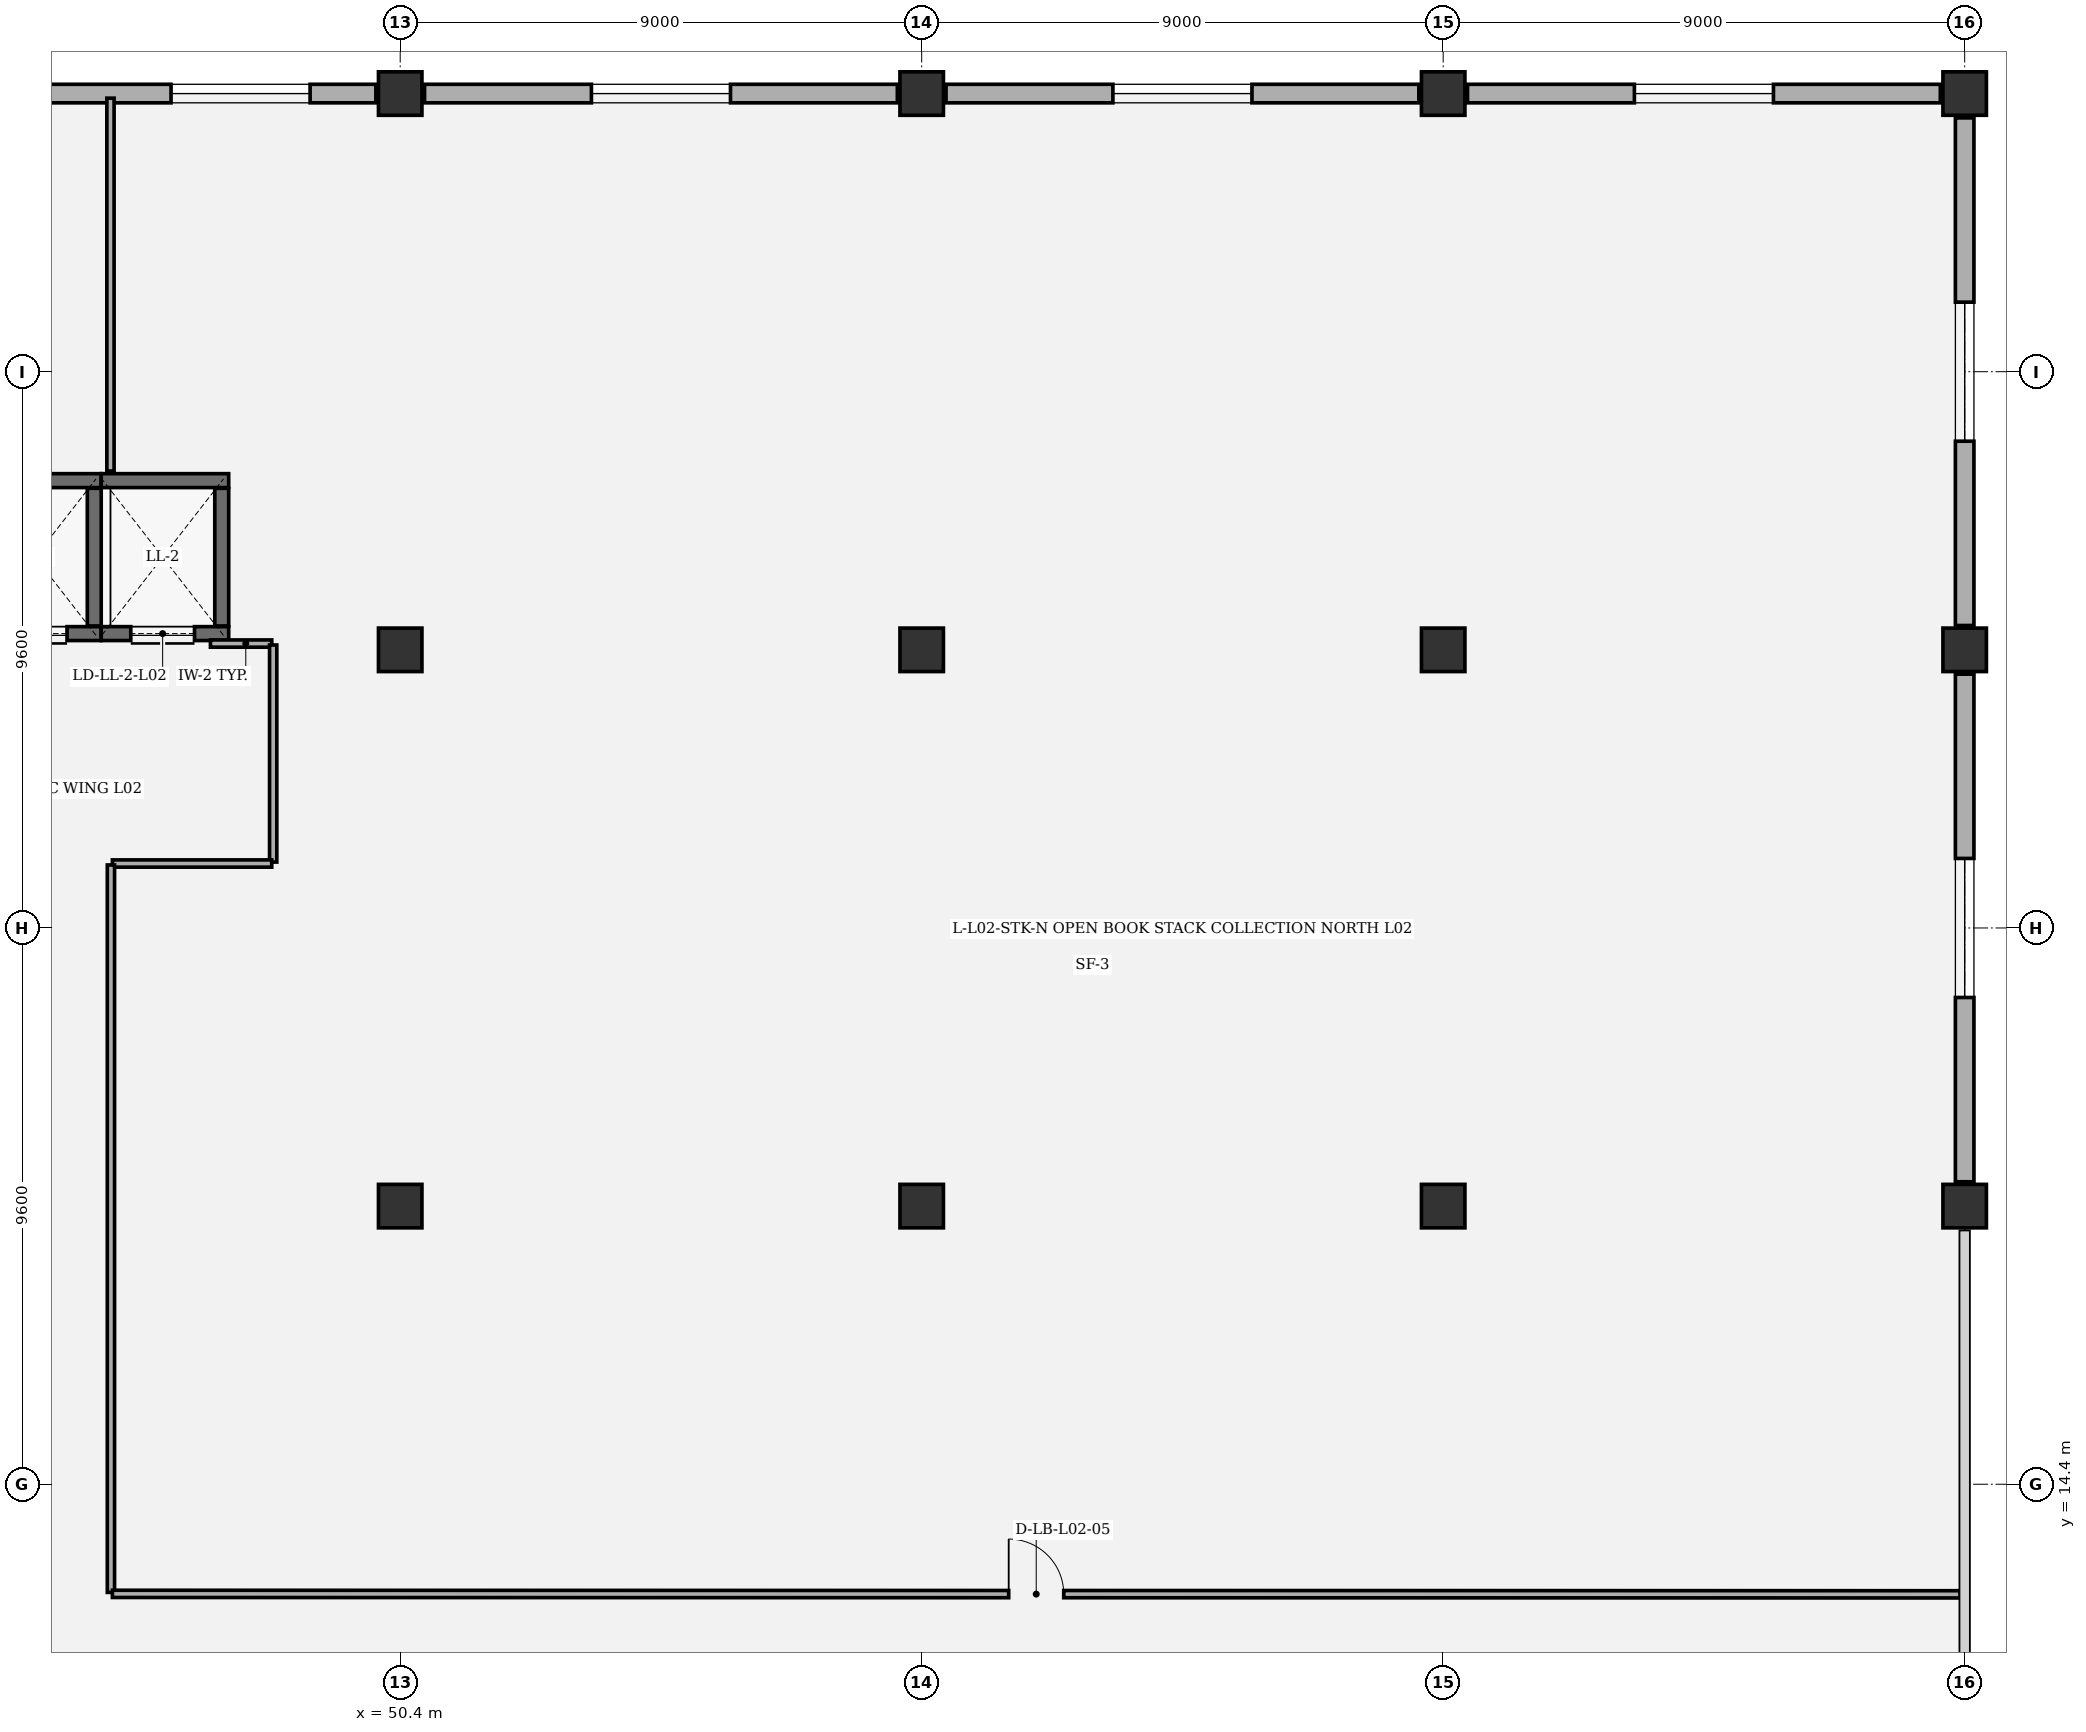
"""IFC4 building model, lengths in metres.
Left out: names, types, materials, properties, quantities, classifications, styles, units other than length and angle.
Written with IfcOpenShell. Run it as: python <this file> out.ifc"""

import sys

from ifc_helpers import new_model, si_unit, direction, frame, frame_2d, origin, origin_2d, place, context, subcontext, project, spatial, rectangle, extrude, element, fill, save


model = new_model("IFC4")
c1 = context("Model", 3, precision=1e-05, world=origin(), true_north=direction((0.0, 1.0)))
c2 = subcontext(c1, "Body", "Model", "MODEL_VIEW")
j1 = project(units=[si_unit("LENGTHUNIT", "METRE"), si_unit("PLANEANGLEUNIT", "RADIAN")], contexts=[c1])
p1 = place(None, origin())
s1 = spatial("IfcSite", under=j1, at=p1, CompositionType="ELEMENT")
p2 = place(p1, origin())
s2 = spatial("IfcBuilding", under=s1, at=p2, CompositionType="ELEMENT")
p3 = place(p2, frame((0.0, 0.0, 12.0)))
s3 = spatial("IfcBuildingStorey", under=s2, at=p3, CompositionType="ELEMENT", Elevation=12.0)
for number, where, z_axis, x_axis in (
    (1, (50.4, 19.2, 0.0), (0.0, 0.0, 1.0), (1.0, 0.0, 0.0)),
    (2, (50.4, 28.8, 0.0), (0.0, 0.0, 1.0), (1.0, 0.0, 0.0)),
    (3, (50.4, 38.4, 0.0), (0.0, 0.0, 1.0), (1.0, 0.0, 0.0)),
    (4, (59.4, 19.2, 0.0), (0.0, 0.0, 1.0), (1.0, 0.0, 0.0)),
    (5, (59.4, 28.8, 0.0), (0.0, 0.0, 1.0), (1.0, 0.0, 0.0)),
    (6, (59.4, 38.4, 0.0), (0.0, 0.0, 1.0), (1.0, 0.0, 0.0)),
    (7, (68.4, 19.2, 0.0), (0.0, 0.0, 1.0), (1.0, 0.0, 0.0)),
    (8, (68.4, 28.8, 0.0), (0.0, 0.0, 1.0), (1.0, 0.0, 0.0)),
    (9, (68.4, 38.4, 0.0), (0.0, 0.0, 1.0), (1.0, 0.0, 0.0)),
    (10, (77.4, 19.2, 0.0), (0.0, 0.0, 1.0), (1.0, 0.0, 0.0)),
    (11, (77.4, 28.8, 0.0), (0.0, 0.0, 1.0), (1.0, 0.0, 0.0)),
    (12, (77.4, 38.4, 0.0), (0.0, 0.0, 1.0), (1.0, 0.0, 0.0)),
):
    element("IfcColumn", number, at=place(p3, frame(where, z_axis=z_axis, x_axis=x_axis)), inside=s3, PredefinedType="COLUMN", context=c2, shape_type="SweptSolid", body=[
        extrude(rectangle(XDim=0.75, YDim=0.75, at=origin_2d()), origin(), (0.0, 0.0, 1.0), 5.0),
    ])
p4 = place(p3, frame((77.4, 28.38, 0.0), z_axis=(0.0, 0.0, 1.0), x_axis=(0.0, -1.0, 0.0)))
e13 = element("IfcWall", 13, at=p4, inside=s3, PredefinedType="SOLIDWALL", context=c2, shape_type="SweptSolid", body=[
    extrude(rectangle(XDim=8.76, YDim=0.32, at=frame_2d((4.38, 0.0))), origin(), (0.0, 0.0, 1.0), 3.937),
])
p5 = place(p4, frame((3.18, 0.0, 0.8)))
e14 = element("IfcOpeningElement", 14, at=p5, cuts=e13, PredefinedType="OPENING", context=c2, shape_type="SweptSolid", body=[
    extrude(rectangle(XDim=2.4, YDim=1.65, at=frame_2d((1.2, 0.825))), frame((0.0, 0.17, 0.0), z_axis=(0.0, -1.0, 0.0), x_axis=(1.0, 0.0, 0.0)), (0.0, 0.0, 1.0), 0.34),
])
p6 = place(p3, frame((77.4, 37.98, 0.0), z_axis=(0.0, 0.0, 1.0), x_axis=(0.0, -1.0, 0.0)))
e15 = element("IfcWall", 15, at=p6, inside=s3, PredefinedType="SOLIDWALL", context=c2, shape_type="SweptSolid", body=[
    extrude(rectangle(XDim=8.76, YDim=0.32, at=frame_2d((4.38, 0.0))), origin(), (0.0, 0.0, 1.0), 3.937),
])
p7 = place(p6, frame((3.18, 0.0, 0.8)))
e16 = element("IfcOpeningElement", 16, at=p7, cuts=e15, PredefinedType="OPENING", context=c2, shape_type="SweptSolid", body=[
    extrude(rectangle(XDim=2.4, YDim=1.65, at=frame_2d((1.2, 0.825))), frame((0.0, 0.17, 0.0), z_axis=(0.0, -1.0, 0.0), x_axis=(1.0, 0.0, 0.0)), (0.0, 0.0, 1.0), 0.34),
])
p8 = place(p3, frame((68.82, 38.4, 0.0), z_axis=(0.0, 0.0, 1.0), x_axis=(1.0, 0.0, 0.0)))
e17 = element("IfcWall", 17, at=p8, inside=s3, PredefinedType="SOLIDWALL", context=c2, shape_type="SweptSolid", body=[
    extrude(rectangle(XDim=8.16, YDim=0.32, at=frame_2d((4.08, 0.0))), origin(), (0.0, 0.0, 1.0), 3.937),
])
p9 = place(p8, frame((2.88, 0.0, 0.8)))
e18 = element("IfcOpeningElement", 18, at=p9, cuts=e17, PredefinedType="OPENING", context=c2, shape_type="SweptSolid", body=[
    extrude(rectangle(XDim=2.4, YDim=1.65, at=frame_2d((1.2, 0.825))), frame((0.0, 0.17, 0.0), z_axis=(0.0, -1.0, 0.0), x_axis=(1.0, 0.0, 0.0)), (0.0, 0.0, 1.0), 0.34),
])
p10 = place(p3, frame((59.82, 38.4, 0.0), z_axis=(0.0, 0.0, 1.0), x_axis=(1.0, 0.0, 0.0)))
e19 = element("IfcWall", 19, at=p10, inside=s3, PredefinedType="SOLIDWALL", context=c2, shape_type="SweptSolid", body=[
    extrude(rectangle(XDim=8.16, YDim=0.32, at=frame_2d((4.08, 0.0))), origin(), (0.0, 0.0, 1.0), 3.937),
])
p11 = place(p10, frame((2.88, 0.0, 0.8)))
e20 = element("IfcOpeningElement", 20, at=p11, cuts=e19, PredefinedType="OPENING", context=c2, shape_type="SweptSolid", body=[
    extrude(rectangle(XDim=2.4, YDim=1.65, at=frame_2d((1.2, 0.825))), frame((0.0, 0.17, 0.0), z_axis=(0.0, -1.0, 0.0), x_axis=(1.0, 0.0, 0.0)), (0.0, 0.0, 1.0), 0.34),
])
p12 = place(p3, frame((50.82, 38.4, 0.0), z_axis=(0.0, 0.0, 1.0), x_axis=(1.0, 0.0, 0.0)))
e21 = element("IfcWall", 21, at=p12, inside=s3, PredefinedType="SOLIDWALL", context=c2, shape_type="SweptSolid", body=[
    extrude(rectangle(XDim=8.16, YDim=0.32, at=frame_2d((4.08, 0.0))), origin(), (0.0, 0.0, 1.0), 3.937),
])
p13 = place(p12, frame((2.88, 0.0, 0.8)))
e22 = element("IfcOpeningElement", 22, at=p13, cuts=e21, PredefinedType="OPENING", context=c2, shape_type="SweptSolid", body=[
    extrude(rectangle(XDim=2.4, YDim=1.65, at=frame_2d((1.2, 0.825))), frame((0.0, 0.17, 0.0), z_axis=(0.0, -1.0, 0.0), x_axis=(1.0, 0.0, 0.0)), (0.0, 0.0, 1.0), 0.34),
])
p14 = place(p3, frame((41.82, 38.4, 0.0), z_axis=(0.0, 0.0, 1.0), x_axis=(1.0, 0.0, 0.0)))
e23 = element("IfcWall", 23, at=p14, inside=s3, PredefinedType="SOLIDWALL", context=c2, shape_type="SweptSolid", body=[
    extrude(rectangle(XDim=8.16, YDim=0.32, at=frame_2d((4.08, 0.0))), origin(), (0.0, 0.0, 1.0), 3.937),
])
p15 = place(p14, frame((4.625, 0.0, 0.8)))
e24 = element("IfcOpeningElement", 24, at=p15, cuts=e23, PredefinedType="OPENING", context=c2, shape_type="SweptSolid", body=[
    extrude(rectangle(XDim=2.4, YDim=1.65, at=frame_2d((1.2, 0.825))), frame((0.0, 0.17, 0.0), z_axis=(0.0, -1.0, 0.0), x_axis=(1.0, 0.0, 0.0)), (0.0, 0.0, 1.0), 0.34),
])
p16 = place(p3, frame((45.24, 29.08, 0.0), z_axis=(0.0, 0.0, 1.0), x_axis=(-1.0, 0.0, 0.0)))
e25 = element("IfcWall", 25, at=p16, inside=s3, PredefinedType="SHEAR", context=c2, shape_type="SweptSolid", body=[
    extrude(rectangle(XDim=2.28, YDim=0.24, at=frame_2d((1.14, 0.0))), origin(), (0.0, 0.0, 1.0), 4.74),
])
p17 = place(p16, frame((0.59, 0.0, 0.0)))
e26 = element("IfcOpeningElement", 26, at=p17, cuts=e25, PredefinedType="OPENING", context=c2, shape_type="SweptSolid", body=[
    extrude(rectangle(XDim=1.1, YDim=2.2, at=frame_2d((0.55, 1.1))), frame((0.0, 0.13, 0.0), z_axis=(0.0, -1.0, 0.0), x_axis=(1.0, 0.0, 0.0)), (0.0, 0.0, 1.0), 0.26),
])
p18 = place(p3, frame((42.96, 31.72, 0.0), z_axis=(0.0, 0.0, 1.0), x_axis=(1.0, 0.0, 0.0)))
e27 = element("IfcWall", 27, at=p18, inside=s3, PredefinedType="SHEAR", context=c2, shape_type="SweptSolid", body=[
    extrude(rectangle(XDim=2.28, YDim=0.24, at=frame_2d((1.14, 0.0))), origin(), (0.0, 0.0, 1.0), 4.74),
])
p19 = place(p3, frame((45.12, 31.588, 0.0), z_axis=(0.0, 0.0, 1.0), x_axis=(0.0, -1.0, 0.0)))
e28 = element("IfcWall", 28, at=p19, inside=s3, PredefinedType="SHEAR", context=c2, shape_type="SweptSolid", body=[
    extrude(rectangle(XDim=2.376, YDim=0.24, at=frame_2d((1.188, 0.0))), origin(), (0.0, 0.0, 1.0), 4.74),
])
p20 = place(p3, frame((47.44, 29.08, 0.0), z_axis=(0.0, 0.0, 1.0), x_axis=(-1.0, 0.0, 0.0)))
e29 = element("IfcWall", 29, at=p20, inside=s3, PredefinedType="SHEAR", context=c2, shape_type="SweptSolid", body=[
    extrude(rectangle(XDim=2.2, YDim=0.24, at=frame_2d((1.1, 0.0))), origin(), (0.0, 0.0, 1.0), 4.74),
])
p21 = place(p20, frame((0.59, 0.0, 0.0)))
e30 = element("IfcOpeningElement", 30, at=p21, cuts=e29, PredefinedType="OPENING", context=c2, shape_type="SweptSolid", body=[
    extrude(rectangle(XDim=1.1, YDim=2.2, at=frame_2d((0.55, 1.1))), frame((0.0, 0.13, 0.0), z_axis=(0.0, -1.0, 0.0), x_axis=(1.0, 0.0, 0.0)), (0.0, 0.0, 1.0), 0.26),
])
p22 = place(p3, frame((45.24, 31.72, 0.0), z_axis=(0.0, 0.0, 1.0), x_axis=(1.0, 0.0, 0.0)))
e31 = element("IfcWall", 31, at=p22, inside=s3, PredefinedType="SHEAR", context=c2, shape_type="SweptSolid", body=[
    extrude(rectangle(XDim=2.2, YDim=0.24, at=frame_2d((1.1, 0.0))), origin(), (0.0, 0.0, 1.0), 4.74),
])
p23 = place(p3, frame((47.32, 31.588, 0.0), z_axis=(0.0, 0.0, 1.0), x_axis=(0.0, -1.0, 0.0)))
e32 = element("IfcWall", 32, at=p23, inside=s3, PredefinedType="SHEAR", context=c2, shape_type="SweptSolid", body=[
    extrude(rectangle(XDim=2.376, YDim=0.24, at=frame_2d((1.188, 0.0))), origin(), (0.0, 0.0, 1.0), 4.74),
])
p24 = place(p3, frame((48.183, 28.908, 0.0), z_axis=(0.0, 0.0, 1.0), x_axis=(-1.0, 0.0, 0.0)))
e33 = element("IfcWall", 33, at=p24, inside=s3, PredefinedType="PARTITIONING", context=c2, shape_type="SweptSolid", body=[
    extrude(rectangle(XDim=1.058, YDim=0.125, at=frame_2d((0.529, 0.0))), origin(), (0.0, 0.0, 1.0), 4.014),
])
p25 = place(p3, frame((48.208, 28.883, 0.0), z_axis=(0.0, 0.0, 1.0), x_axis=(0.0, -1.0, 0.0)))
e34 = element("IfcWall", 34, at=p25, inside=s3, PredefinedType="PARTITIONING", context=c2, shape_type="SweptSolid", body=[
    extrude(rectangle(XDim=3.746, YDim=0.125, at=frame_2d((1.873, 0.0))), origin(), (0.0, 0.0, 1.0), 4.74),
])
p26 = place(p3, frame((45.433, 25.112, 0.0), z_axis=(0.0, 0.0, 1.0), x_axis=(1.0, 0.0, 0.0)))
e35 = element("IfcWall", 35, at=p26, inside=s3, PredefinedType="PARTITIONING", context=c2, shape_type="SweptSolid", body=[
    extrude(rectangle(XDim=2.75, YDim=0.125, at=frame_2d((1.375, 0.0))), origin(), (0.0, 0.0, 1.0), 4.74),
])
p27 = place(p3, frame((45.408, 25.087, 0.0), z_axis=(0.0, 0.0, 1.0), x_axis=(0.0, -1.0, 0.0)))
e36 = element("IfcWall", 36, at=p27, inside=s3, PredefinedType="PARTITIONING", context=c2, shape_type="SweptSolid", body=[
    extrude(rectangle(XDim=12.554, YDim=0.125, at=frame_2d((6.277, 0.0))), origin(), (0.0, 0.0, 1.0), 4.74),
])
p28 = place(p3, frame((45.433, 12.508, 0.0), z_axis=(0.0, 0.0, 1.0), x_axis=(0.999999968081, -0.000252662519, 0.0)))
e37 = element("IfcWall", 37, at=p28, inside=s3, PredefinedType="PARTITIONING", context=c2, shape_type="SweptSolid", body=[
    extrude(rectangle(XDim=31.887, YDim=0.125, at=frame_2d((15.943, 0.0))), origin(), (0.0, 0.0, 1.0), 4.74),
])
p29 = place(p28, frame((15.469, 0.0, 0.0)))
e38 = element("IfcOpeningElement", 38, at=p29, cuts=e37, PredefinedType="OPENING", context=c2, shape_type="SweptSolid", body=[
    extrude(rectangle(XDim=0.95, YDim=2.15, at=frame_2d((0.475, 1.075))), frame((0.0, 0.073, 0.0), z_axis=(0.0, -1.0, 0.0), x_axis=(1.0, 0.0, 0.0)), (0.0, 0.0, 1.0), 0.145),
])
p30 = place(p3, frame((45.4, 38.32, 0.0), z_axis=(0.0, 0.0, 1.0), x_axis=(0.0, -1.0, 0.0)))
e39 = element("IfcWall", 39, at=p30, inside=s3, PredefinedType="PARTITIONING", context=c2, shape_type="SweptSolid", body=[
    extrude(rectangle(XDim=6.435, YDim=0.125, at=frame_2d((3.218, 0.0))), origin(), (0.0, 0.0, 1.0), 4.74),
])
p31 = place(p5, origin())
e40 = element("IfcWindow", 40, at=p31, inside=s3, PartitioningType="SINGLE_PANEL", PredefinedType="WINDOW", context=c2, shape_type="SweptSolid", body=[
    extrude(rectangle(XDim=2.4, YDim=1.65, at=frame_2d((1.2, 0.825))), frame((0.0, 0.03, 0.0), z_axis=(0.0, -1.0, 0.0), x_axis=(1.0, 0.0, 0.0)), (0.0, 0.0, 1.0), 0.06),
])
fill(e14, e40)
p32 = place(p7, origin())
e41 = element("IfcWindow", 41, at=p32, inside=s3, PartitioningType="SINGLE_PANEL", PredefinedType="WINDOW", context=c2, shape_type="SweptSolid", body=[
    extrude(rectangle(XDim=2.4, YDim=1.65, at=frame_2d((1.2, 0.825))), frame((0.0, 0.03, 0.0), z_axis=(0.0, -1.0, 0.0), x_axis=(1.0, 0.0, 0.0)), (0.0, 0.0, 1.0), 0.06),
])
fill(e16, e41)
p33 = place(p9, origin())
e42 = element("IfcWindow", 42, at=p33, inside=s3, PartitioningType="SINGLE_PANEL", PredefinedType="WINDOW", context=c2, shape_type="SweptSolid", body=[
    extrude(rectangle(XDim=2.4, YDim=1.65, at=frame_2d((1.2, 0.825))), frame((0.0, 0.03, 0.0), z_axis=(0.0, -1.0, 0.0), x_axis=(1.0, 0.0, 0.0)), (0.0, 0.0, 1.0), 0.06),
])
fill(e18, e42)
p34 = place(p11, origin())
e43 = element("IfcWindow", 43, at=p34, inside=s3, PartitioningType="SINGLE_PANEL", PredefinedType="WINDOW", context=c2, shape_type="SweptSolid", body=[
    extrude(rectangle(XDim=2.4, YDim=1.65, at=frame_2d((1.2, 0.825))), frame((0.0, 0.03, 0.0), z_axis=(0.0, -1.0, 0.0), x_axis=(1.0, 0.0, 0.0)), (0.0, 0.0, 1.0), 0.06),
])
fill(e20, e43)
p35 = place(p13, origin())
e44 = element("IfcWindow", 44, at=p35, inside=s3, PartitioningType="SINGLE_PANEL", PredefinedType="WINDOW", context=c2, shape_type="SweptSolid", body=[
    extrude(rectangle(XDim=2.4, YDim=1.65, at=frame_2d((1.2, 0.825))), frame((0.0, 0.03, 0.0), z_axis=(0.0, -1.0, 0.0), x_axis=(1.0, 0.0, 0.0)), (0.0, 0.0, 1.0), 0.06),
])
fill(e22, e44)
p36 = place(p15, origin())
e45 = element("IfcWindow", 45, at=p36, inside=s3, PartitioningType="SINGLE_PANEL", PredefinedType="WINDOW", context=c2, shape_type="SweptSolid", body=[
    extrude(rectangle(XDim=2.4, YDim=1.65, at=frame_2d((1.2, 0.825))), frame((0.0, 0.03, 0.0), z_axis=(0.0, -1.0, 0.0), x_axis=(1.0, 0.0, 0.0)), (0.0, 0.0, 1.0), 0.06),
])
fill(e24, e45)
p37 = place(p17, origin())
e46 = element("IfcDoor", 46, at=p37, inside=s3, OperationType="DOUBLE_DOOR_SLIDING", PredefinedType="DOOR", context=c2, shape_type="SweptSolid", body=[
    extrude(rectangle(XDim=1.1, YDim=2.2, at=frame_2d((0.55, 1.1))), frame((0.0, 0.025, 0.0), z_axis=(0.0, -1.0, 0.0), x_axis=(1.0, 0.0, 0.0)), (0.0, 0.0, 1.0), 0.05),
])
fill(e26, e46)
p38 = place(p21, origin())
e47 = element("IfcDoor", 47, at=p38, inside=s3, OperationType="DOUBLE_DOOR_SLIDING", PredefinedType="DOOR", context=c2, shape_type="SweptSolid", body=[
    extrude(rectangle(XDim=1.1, YDim=2.2, at=frame_2d((0.55, 1.1))), frame((0.0, 0.025, 0.0), z_axis=(0.0, -1.0, 0.0), x_axis=(1.0, 0.0, 0.0)), (0.0, 0.0, 1.0), 0.05),
])
fill(e30, e47)
p39 = place(p29, origin())
e48 = element("IfcDoor", 48, at=p39, inside=s3, OperationType="SINGLE_SWING_LEFT", PredefinedType="DOOR", context=c2, shape_type="SweptSolid", body=[
    extrude(rectangle(XDim=0.95, YDim=2.15, at=frame_2d((0.475, 1.075))), frame((0.0, 0.025, 0.0), z_axis=(0.0, -1.0, 0.0), x_axis=(1.0, 0.0, 0.0)), (0.0, 0.0, 1.0), 0.05),
])
fill(e38, e48)
save(model, sys.argv[1])
